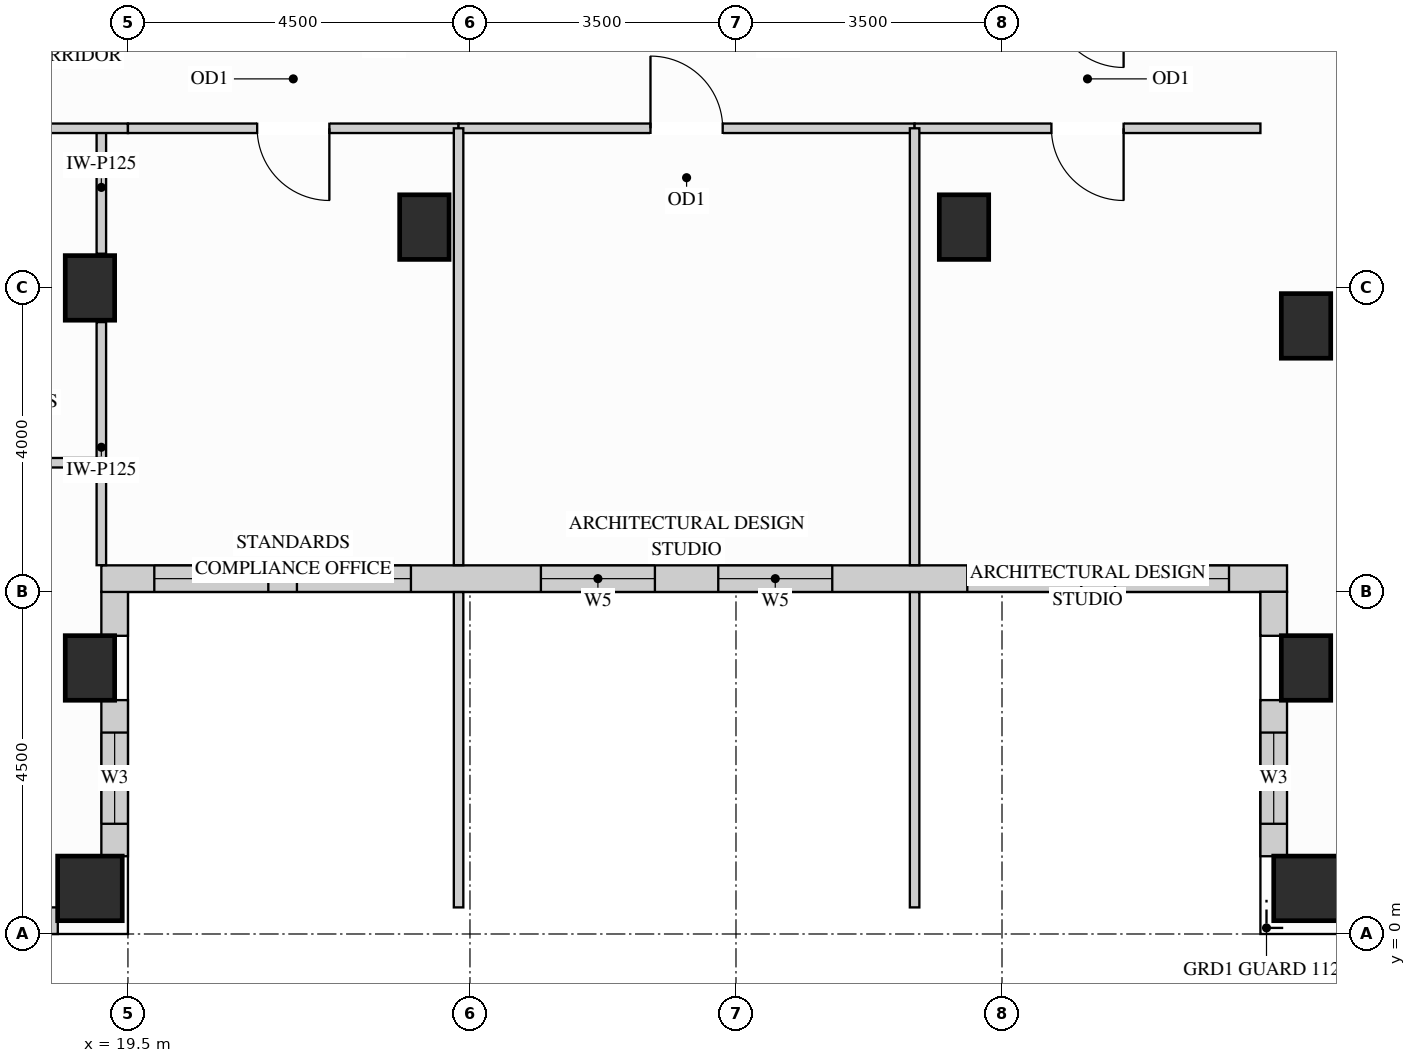
"""IFC4 building model, lengths in metres.
Left out: names, types, materials, properties, quantities, classifications, styles, units other than length and angle.
Written with IfcOpenShell. Run it as: python <this file> out.ifc"""

import sys

from ifc_helpers import new_model, si_unit, direction, frame, frame_2d, origin, origin_2d, place, context, subcontext, project, spatial, rectangle, extrude, source, transform, mapped, element, fill, save


model = new_model("IFC4")
c1 = context("Model", 3, precision=1e-05, world=origin(), true_north=direction((0.0, 1.0)))
c2 = subcontext(c1, "Body", "Model", "MODEL_VIEW")
j1 = project(units=[si_unit("LENGTHUNIT", "METRE"), si_unit("PLANEANGLEUNIT", "RADIAN")], contexts=[c1])
p1 = place(None, origin())
s1 = spatial("IfcSite", under=j1, at=p1, CompositionType="ELEMENT")
p2 = place(p1, origin())
s2 = spatial("IfcBuilding", under=s1, at=p2, CompositionType="ELEMENT")
p3 = place(p2, frame((0.0, 0.0, 219.6)))
s3 = spatial("IfcBuildingStorey", under=s2, at=p3, CompositionType="ELEMENT", Elevation=219.6)
m1 = source(origin(), c2, "Body", "SweptSolid", [
    extrude(rectangle(XDim=0.65, YDim=0.85, at=origin_2d()), origin(), (0.0, 0.0, 1.0), 3.4),
])
for number, where, z_axis, x_axis in (
    (1, (19.0, 3.5, 0.0), (0.0, 0.0, 1.0), (1.0, 0.0, 0.0)),
    (2, (19.0, 8.5, 0.0), (0.0, 0.0, 1.0), (1.0, 0.0, 0.0)),
    (3, (35.0, 3.5, 0.0), (0.0, 0.0, 1.0), (1.0, 0.0, 0.0)),
    (4, (35.0, 8.0, 0.0), (0.0, 0.0, 1.0), (1.0, 0.0, 0.0)),
    (5, (23.4, 9.3, 0.0), (0.0, 0.0, 1.0), (1.0, 0.0, 0.0)),
    (6, (30.5, 9.3, 0.0), (0.0, 0.0, 1.0), (1.0, 0.0, 0.0)),
):
    element("IfcColumn", number, at=place(p3, frame(where, z_axis=z_axis, x_axis=x_axis)), inside=s3, PredefinedType="COLUMN", context=c2, shape_type="MappedRepresentation", body=[
        mapped(m1, transform((0.0, 0.0, 0.0), x_axis=(1.0, 0.0, 0.0), y_axis=(0.0, 1.0, 0.0), z_axis=(0.0, 0.0, 1.0))),
    ])
m2 = source(origin(), c2, "Body", "SweptSolid", [
    extrude(rectangle(XDim=0.85, YDim=0.85, at=origin_2d()), origin(), (0.0, 0.0, 1.0), 3.4),
])
for number, where, z_axis, x_axis in (
    (7, (19.0, 0.6, 0.0), (0.0, 0.0, 1.0), (1.0, 0.0, 0.0)),
    (8, (35.0, 0.6, 0.0), (0.0, 0.0, 1.0), (1.0, 0.0, 0.0)),
):
    element("IfcColumn", number, at=place(p3, frame(where, z_axis=z_axis, x_axis=x_axis)), inside=s3, PredefinedType="COLUMN", context=c2, shape_type="MappedRepresentation", body=[
        mapped(m2, transform((0.0, 0.0, 0.0), x_axis=(1.0, 0.0, 0.0), y_axis=(0.0, 1.0, 0.0), z_axis=(0.0, 0.0, 1.0))),
    ])
p4 = place(p3, frame((14.923, 0.175, 0.0), z_axis=(0.0, 0.0, 1.0), x_axis=(1.0, 0.0, 0.0)))
e9 = element("IfcWall", 9, at=p4, inside=s3, PredefinedType="SOLIDWALL", context=c2, shape_type="SweptSolid", body=[
    extrude(rectangle(XDim=3.654, YDim=0.35, at=frame_2d((1.827, 0.0))), origin(), (0.0, 0.0, 1.0), 3.385),
])
p5 = place(p4, frame((0.627, 0.0, 0.78)))
e10 = element("IfcOpeningElement", 10, at=p5, cuts=e9, PredefinedType="OPENING", context=c2, shape_type="SweptSolid", body=[
    extrude(rectangle(XDim=2.4, YDim=2.1, at=frame_2d((1.2, 1.05))), frame((0.0, 0.185, 0.0), z_axis=(0.0, -1.0, 0.0), x_axis=(1.0, 0.0, 0.0)), (0.0, 0.0, 1.0), 0.37),
])
p6 = place(p3, frame((19.325, 1.023, 0.0), z_axis=(0.0, 0.0, 1.0), x_axis=(0.0, 1.0, 0.0)))
e11 = element("IfcWall", 11, at=p6, inside=s3, PredefinedType="SOLIDWALL", context=c2, shape_type="SweptSolid", body=[
    extrude(rectangle(XDim=2.054, YDim=0.35, at=frame_2d((1.027, 0.0))), origin(), (0.0, 0.0, 1.0), 2.619),
])
p7 = place(p6, frame((0.427, 0.0, 0.78)))
e12 = element("IfcOpeningElement", 12, at=p7, cuts=e11, PredefinedType="OPENING", context=c2, shape_type="SweptSolid", body=[
    extrude(rectangle(XDim=1.2, YDim=1.659, at=frame_2d((0.6, 0.83))), frame((0.0, 0.185, 0.0), z_axis=(0.0, -1.0, 0.0), x_axis=(1.0, 0.0, 0.0)), (0.0, 0.0, 1.0), 0.37),
])
m3 = source(origin(), c2, "Body", "SweptSolid", [
    extrude(rectangle(XDim=0.579, YDim=0.35, at=frame_2d((0.29, 0.0))), origin(), (0.0, 0.0, 1.0), 2.773),
])
p8 = place(p3, frame((19.325, 3.923, 0.0), z_axis=(0.0, 0.0, 1.0), x_axis=(0.0, 1.0, 0.0)))
e13 = element("IfcWall", 13, at=p8, inside=s3, PredefinedType="SOLIDWALL", context=c2, shape_type="MappedRepresentation", body=[
    mapped(m3, transform((0.0, 0.0, 0.0), x_axis=(1.0, 0.0, 0.0), y_axis=(0.0, 1.0, 0.0), z_axis=(0.0, 0.0, 1.0))),
])
p9 = place(p3, frame((19.15, 4.675, 0.0), z_axis=(0.0, 0.0, 1.0), x_axis=(1.0, 0.0, 0.0)))
e14 = element("IfcWall", 14, at=p9, inside=s3, PredefinedType="SOLIDWALL", context=c2, shape_type="SweptSolid", body=[
    extrude(rectangle(XDim=15.6, YDim=0.35, at=frame_2d((7.8, 0.0))), origin(), (0.0, 0.0, 1.0), 3.385),
])
p10 = place(p9, frame((0.697, 0.0, 0.78)))
e15 = element("IfcOpeningElement", 15, at=p10, cuts=e14, PredefinedType="OPENING", context=c2, shape_type="SweptSolid", body=[
    extrude(rectangle(XDim=1.5, YDim=2.0, at=frame_2d((0.75, 1.0))), frame((0.0, 0.185, 0.0), z_axis=(0.0, -1.0, 0.0), x_axis=(1.0, 0.0, 0.0)), (0.0, 0.0, 1.0), 0.37),
])
p11 = place(p9, frame((2.573, 0.0, 0.78)))
e16 = element("IfcOpeningElement", 16, at=p11, cuts=e14, PredefinedType="OPENING", context=c2, shape_type="SweptSolid", body=[
    extrude(rectangle(XDim=1.5, YDim=2.0, at=frame_2d((0.75, 1.0))), frame((0.0, 0.185, 0.0), z_axis=(0.0, -1.0, 0.0), x_axis=(1.0, 0.0, 0.0)), (0.0, 0.0, 1.0), 0.37),
])
p12 = place(p9, frame((5.783, 0.0, 0.78)))
e17 = element("IfcOpeningElement", 17, at=p12, cuts=e14, PredefinedType="OPENING", context=c2, shape_type="SweptSolid", body=[
    extrude(rectangle(XDim=1.5, YDim=2.0, at=frame_2d((0.75, 1.0))), frame((0.0, 0.185, 0.0), z_axis=(0.0, -1.0, 0.0), x_axis=(1.0, 0.0, 0.0)), (0.0, 0.0, 1.0), 0.37),
])
p13 = place(p9, frame((8.117, 0.0, 0.78)))
e18 = element("IfcOpeningElement", 18, at=p13, cuts=e14, PredefinedType="OPENING", context=c2, shape_type="SweptSolid", body=[
    extrude(rectangle(XDim=1.5, YDim=2.0, at=frame_2d((0.75, 1.0))), frame((0.0, 0.185, 0.0), z_axis=(0.0, -1.0, 0.0), x_axis=(1.0, 0.0, 0.0)), (0.0, 0.0, 1.0), 0.37),
])
p14 = place(p9, frame((11.393, 0.0, 0.78)))
e19 = element("IfcOpeningElement", 19, at=p14, cuts=e14, PredefinedType="OPENING", context=c2, shape_type="SweptSolid", body=[
    extrude(rectangle(XDim=1.5, YDim=2.0, at=frame_2d((0.75, 1.0))), frame((0.0, 0.185, 0.0), z_axis=(0.0, -1.0, 0.0), x_axis=(1.0, 0.0, 0.0)), (0.0, 0.0, 1.0), 0.37),
])
p15 = place(p9, frame((13.337, 0.0, 0.78)))
e20 = element("IfcOpeningElement", 20, at=p15, cuts=e14, PredefinedType="OPENING", context=c2, shape_type="SweptSolid", body=[
    extrude(rectangle(XDim=1.5, YDim=2.0, at=frame_2d((0.75, 1.0))), frame((0.0, 0.185, 0.0), z_axis=(0.0, -1.0, 0.0), x_axis=(1.0, 0.0, 0.0)), (0.0, 0.0, 1.0), 0.37),
])
m4 = source(origin(), c2, "Body", "SweptSolid", [
    extrude(rectangle(XDim=0.579, YDim=0.35, at=frame_2d((0.29, 0.0))), origin(), (0.0, 0.0, 1.0), 3.385),
])
p16 = place(p3, frame((34.575, 4.502, 0.0), z_axis=(0.0, 0.0, 1.0), x_axis=(0.0, -1.0, 0.0)))
e21 = element("IfcWall", 21, at=p16, inside=s3, PredefinedType="SOLIDWALL", context=c2, shape_type="MappedRepresentation", body=[
    mapped(m4, transform((0.0, 0.0, 0.0), x_axis=(1.0, 0.0, 0.0), y_axis=(0.0, 1.0, 0.0), z_axis=(0.0, 0.0, 1.0))),
])
p17 = place(p3, frame((34.575, 3.077, 0.0), z_axis=(0.0, 0.0, 1.0), x_axis=(0.0, -1.0, 0.0)))
e22 = element("IfcWall", 22, at=p17, inside=s3, PredefinedType="SOLIDWALL", context=c2, shape_type="SweptSolid", body=[
    extrude(rectangle(XDim=2.054, YDim=0.35, at=frame_2d((1.027, 0.0))), origin(), (0.0, 0.0, 1.0), 3.385),
])
p18 = place(p17, frame((0.427, 0.0, 0.78)))
e23 = element("IfcOpeningElement", 23, at=p18, cuts=e22, PredefinedType="OPENING", context=c2, shape_type="SweptSolid", body=[
    extrude(rectangle(XDim=1.2, YDim=2.0, at=frame_2d((0.6, 1.0))), frame((0.0, 0.185, 0.0), z_axis=(0.0, -1.0, 0.0), x_axis=(1.0, 0.0, 0.0)), (0.0, 0.0, 1.0), 0.37),
])
m5 = source(origin(), c2, "Body", "SweptSolid", [
    extrude(rectangle(XDim=3.198, YDim=0.125, at=frame_2d((1.599, 0.0))), origin(), (0.0, 0.0, 1.0), 2.773),
])
p19 = place(p3, frame((19.15, 4.852, 0.0), z_axis=(0.0, 0.0, 1.0), x_axis=(0.0, 1.0, 0.0)))
e24 = element("IfcWall", 24, at=p19, inside=s3, PredefinedType="PARTITIONING", context=c2, shape_type="MappedRepresentation", body=[
    mapped(m5, transform((0.0, 0.0, 0.0), x_axis=(1.0, 0.0, 0.0), y_axis=(0.0, 1.0, 0.0), z_axis=(0.0, 0.0, 1.0))),
])
m6 = source(origin(), c2, "Body", "SweptSolid", [
    extrude(rectangle(XDim=1.65, YDim=0.125, at=frame_2d((0.825, 0.0))), origin(), (0.0, 0.0, 1.0), 2.773),
])
p20 = place(p3, frame((19.15, 8.95, 0.0), z_axis=(0.0, 0.0, 1.0), x_axis=(0.0, 1.0, 0.0)))
e25 = element("IfcWall", 25, at=p20, inside=s3, PredefinedType="PARTITIONING", context=c2, shape_type="MappedRepresentation", body=[
    mapped(m6, transform((0.0, 0.0, 0.0), x_axis=(1.0, 0.0, 0.0), y_axis=(0.0, 1.0, 0.0), z_axis=(0.0, 0.0, 1.0))),
])
m7 = source(origin(), c2, "Body", "SweptSolid", [
    extrude(rectangle(XDim=2.95, YDim=0.125, at=frame_2d((1.475, 0.0))), origin(), (0.0, 0.0, 1.0), 3.385),
])
p21 = place(p3, frame((16.55, 10.6, 0.0), z_axis=(0.0, 0.0, 1.0), x_axis=(1.0, 0.0, 0.0)))
e26 = element("IfcWall", 26, at=p21, inside=s3, PredefinedType="PARTITIONING", context=c2, shape_type="MappedRepresentation", body=[
    mapped(m7, transform((0.0, 0.0, 0.0), x_axis=(1.0, 0.0, 0.0), y_axis=(0.0, 1.0, 0.0), z_axis=(0.0, 0.0, 1.0))),
])
p22 = place(p3, frame((19.5, 10.6, 0.0), z_axis=(0.0, 0.0, 1.0), x_axis=(1.0, 0.0, 0.0)))
e27 = element("IfcWall", 27, at=p22, inside=s3, PredefinedType="PARTITIONING", context=c2, shape_type="SweptSolid", body=[
    extrude(rectangle(XDim=4.35, YDim=0.125, at=frame_2d((2.175, 0.0))), origin(), (0.0, 0.0, 1.0), 3.385),
])
p23 = place(p22, frame((1.7, 0.0, 0.0)))
e28 = element("IfcOpeningElement", 28, at=p23, cuts=e27, PredefinedType="OPENING", context=c2, shape_type="SweptSolid", body=[
    extrude(rectangle(XDim=0.95, YDim=2.15, at=frame_2d((0.475, 1.075))), frame((0.0, 0.073, 0.0), z_axis=(0.0, -1.0, 0.0), x_axis=(1.0, 0.0, 0.0)), (0.0, 0.0, 1.0), 0.145),
])
p24 = place(p3, frame((23.85, 10.6, 0.0), z_axis=(0.0, 0.0, 1.0), x_axis=(1.0, 0.0, 0.0)))
e29 = element("IfcWall", 29, at=p24, inside=s3, PredefinedType="PARTITIONING", context=c2, shape_type="SweptSolid", body=[
    extrude(rectangle(XDim=6.0, YDim=0.125, at=frame_2d((3.0, 0.0))), origin(), (0.0, 0.0, 1.0), 3.385),
])
p25 = place(p24, frame((2.525, 0.0, 0.0)))
e30 = element("IfcOpeningElement", 30, at=p25, cuts=e29, PredefinedType="OPENING", context=c2, shape_type="SweptSolid", body=[
    extrude(rectangle(XDim=0.95, YDim=2.15, at=frame_2d((0.475, 1.075))), frame((0.0, 0.073, 0.0), z_axis=(0.0, -1.0, 0.0), x_axis=(1.0, 0.0, 0.0)), (0.0, 0.0, 1.0), 0.145),
])
p26 = place(p3, frame((29.85, 10.6, 0.0), z_axis=(0.0, 0.0, 1.0), x_axis=(1.0, 0.0, 0.0)))
e31 = element("IfcWall", 31, at=p26, inside=s3, PredefinedType="PARTITIONING", context=c2, shape_type="SweptSolid", body=[
    extrude(rectangle(XDim=4.55, YDim=0.125, at=frame_2d((2.275, 0.0))), origin(), (0.0, 0.0, 1.0), 3.385),
])
p27 = place(p26, frame((1.8, 0.0, 0.0)))
e32 = element("IfcOpeningElement", 32, at=p27, cuts=e31, PredefinedType="OPENING", context=c2, shape_type="SweptSolid", body=[
    extrude(rectangle(XDim=0.95, YDim=2.15, at=frame_2d((0.475, 1.075))), frame((0.0, 0.073, 0.0), z_axis=(0.0, -1.0, 0.0), x_axis=(1.0, 0.0, 0.0)), (0.0, 0.0, 1.0), 0.145),
])
m8 = source(origin(), c2, "Body", "SweptSolid", [
    extrude(rectangle(XDim=4.148, YDim=0.125, at=frame_2d((2.074, 0.0))), origin(), (0.0, 0.0, 1.0), 3.385),
])
p28 = place(p3, frame((23.85, 0.35, 0.0), z_axis=(0.0, 0.0, 1.0), x_axis=(0.0, 1.0, 0.0)))
e33 = element("IfcWall", 33, at=p28, inside=s3, PredefinedType="PARTITIONING", context=c2, shape_type="MappedRepresentation", body=[
    mapped(m8, transform((0.0, 0.0, 0.0), x_axis=(1.0, 0.0, 0.0), y_axis=(0.0, 1.0, 0.0), z_axis=(0.0, 0.0, 1.0))),
])
m9 = source(origin(), c2, "Body", "SweptSolid", [
    extrude(rectangle(XDim=5.748, YDim=0.125, at=frame_2d((2.874, 0.0))), origin(), (0.0, 0.0, 1.0), 3.385),
])
p29 = place(p3, frame((23.85, 4.852, 0.0), z_axis=(0.0, 0.0, 1.0), x_axis=(0.0, 1.0, 0.0)))
e34 = element("IfcWall", 34, at=p29, inside=s3, PredefinedType="PARTITIONING", context=c2, shape_type="MappedRepresentation", body=[
    mapped(m9, transform((0.0, 0.0, 0.0), x_axis=(1.0, 0.0, 0.0), y_axis=(0.0, 1.0, 0.0), z_axis=(0.0, 0.0, 1.0))),
])
p30 = place(p3, frame((29.85, 0.35, 0.0), z_axis=(0.0, 0.0, 1.0), x_axis=(0.0, 1.0, 0.0)))
e35 = element("IfcWall", 35, at=p30, inside=s3, PredefinedType="PARTITIONING", context=c2, shape_type="MappedRepresentation", body=[
    mapped(m8, transform((0.0, 0.0, 0.0), x_axis=(1.0, 0.0, 0.0), y_axis=(0.0, 1.0, 0.0), z_axis=(0.0, 0.0, 1.0))),
])
p31 = place(p3, frame((29.85, 4.852, 0.0), z_axis=(0.0, 0.0, 1.0), x_axis=(0.0, 1.0, 0.0)))
e36 = element("IfcWall", 36, at=p31, inside=s3, PredefinedType="PARTITIONING", context=c2, shape_type="MappedRepresentation", body=[
    mapped(m9, transform((0.0, 0.0, 0.0), x_axis=(1.0, 0.0, 0.0), y_axis=(0.0, 1.0, 0.0), z_axis=(0.0, 0.0, 1.0))),
])
m10 = source(origin(), c2, "Body", "SweptSolid", [
    extrude(rectangle(XDim=2.6, YDim=0.125, at=frame_2d((1.3, 0.0))), origin(), (0.0, 0.0, 1.0), 2.848),
])
p32 = place(p3, frame((16.55, 6.2, 0.0), z_axis=(0.0, 0.0, 1.0), x_axis=(1.0, 0.0, 0.0)))
e37 = element("IfcWall", 37, at=p32, inside=s3, PredefinedType="PARTITIONING", context=c2, shape_type="MappedRepresentation", body=[
    mapped(m10, transform((0.0, 0.0, 0.0), x_axis=(1.0, 0.0, 0.0), y_axis=(0.0, 1.0, 0.0), z_axis=(0.0, 0.0, 1.0))),
])
m11 = source(origin(), c2, "Body", "SweptSolid", [
    extrude(rectangle(XDim=0.95, YDim=2.15, at=frame_2d((0.475, 1.075))), frame((0.0, 0.025, 0.0), z_axis=(0.0, -1.0, 0.0), x_axis=(1.0, 0.0, 0.0)), (0.0, 0.0, 1.0), 0.05),
])
p33 = place(p23, origin())
e38 = element("IfcDoor", 38, at=p33, inside=s3, OperationType="SINGLE_SWING_RIGHT", PredefinedType="DOOR", context=c2, shape_type="MappedRepresentation", body=[
    mapped(m11, transform((0.0, 0.0, 0.0), x_axis=(1.0, 0.0, 0.0), y_axis=(0.0, 1.0, 0.0), z_axis=(0.0, 0.0, 1.0))),
])
fill(e28, e38)
p34 = place(p25, origin())
e39 = element("IfcDoor", 39, at=p34, inside=s3, OperationType="SINGLE_SWING_LEFT", PredefinedType="DOOR", context=c2, shape_type="MappedRepresentation", body=[
    mapped(m11, transform((0.0, 0.0, 0.0), x_axis=(1.0, 0.0, 0.0), y_axis=(0.0, 1.0, 0.0), z_axis=(0.0, 0.0, 1.0))),
])
fill(e30, e39)
p35 = place(p27, origin())
e40 = element("IfcDoor", 40, at=p35, inside=s3, OperationType="SINGLE_SWING_RIGHT", PredefinedType="DOOR", context=c2, shape_type="MappedRepresentation", body=[
    mapped(m11, transform((0.0, 0.0, 0.0), x_axis=(1.0, 0.0, 0.0), y_axis=(0.0, 1.0, 0.0), z_axis=(0.0, 0.0, 1.0))),
])
fill(e32, e40)
m12 = source(origin(), c2, "Body", "SweptSolid", [
    extrude(rectangle(XDim=1.2, YDim=1.659, at=frame_2d((0.6, 0.83))), frame((0.0, 0.03, 0.0), z_axis=(0.0, -1.0, 0.0), x_axis=(1.0, 0.0, 0.0)), (0.0, 0.0, 1.0), 0.06),
])
p36 = place(p7, origin())
e41 = element("IfcWindow", 41, at=p36, inside=s3, PartitioningType="SINGLE_PANEL", PredefinedType="WINDOW", context=c2, shape_type="MappedRepresentation", body=[
    mapped(m12, transform((0.0, 0.0, 0.0), x_axis=(1.0, 0.0, 0.0), y_axis=(0.0, 1.0, 0.0), z_axis=(0.0, 0.0, 1.0))),
])
fill(e12, e41)
m13 = source(origin(), c2, "Body", "SweptSolid", [
    extrude(rectangle(XDim=1.2, YDim=2.0, at=frame_2d((0.6, 1.0))), frame((0.0, 0.03, 0.0), z_axis=(0.0, -1.0, 0.0), x_axis=(1.0, 0.0, 0.0)), (0.0, 0.0, 1.0), 0.06),
])
p37 = place(p18, origin())
e42 = element("IfcWindow", 42, at=p37, inside=s3, PartitioningType="SINGLE_PANEL", PredefinedType="WINDOW", context=c2, shape_type="MappedRepresentation", body=[
    mapped(m13, transform((0.0, 0.0, 0.0), x_axis=(1.0, 0.0, 0.0), y_axis=(0.0, 1.0, 0.0), z_axis=(0.0, 0.0, 1.0))),
])
fill(e23, e42)
m14 = source(origin(), c2, "Body", "SweptSolid", [
    extrude(rectangle(XDim=1.5, YDim=2.0, at=frame_2d((0.75, 1.0))), frame((0.0, 0.03, 0.0), z_axis=(0.0, -1.0, 0.0), x_axis=(1.0, 0.0, 0.0)), (0.0, 0.0, 1.0), 0.06),
])
p38 = place(p10, origin())
e43 = element("IfcWindow", 43, at=p38, inside=s3, PartitioningType="SINGLE_PANEL", PredefinedType="WINDOW", context=c2, shape_type="MappedRepresentation", body=[
    mapped(m14, transform((0.0, 0.0, 0.0), x_axis=(1.0, 0.0, 0.0), y_axis=(0.0, 1.0, 0.0), z_axis=(0.0, 0.0, 1.0))),
])
fill(e15, e43)
p39 = place(p11, origin())
e44 = element("IfcWindow", 44, at=p39, inside=s3, PartitioningType="SINGLE_PANEL", PredefinedType="WINDOW", context=c2, shape_type="MappedRepresentation", body=[
    mapped(m14, transform((0.0, 0.0, 0.0), x_axis=(1.0, 0.0, 0.0), y_axis=(0.0, 1.0, 0.0), z_axis=(0.0, 0.0, 1.0))),
])
fill(e16, e44)
p40 = place(p12, origin())
e45 = element("IfcWindow", 45, at=p40, inside=s3, PartitioningType="SINGLE_PANEL", PredefinedType="WINDOW", context=c2, shape_type="MappedRepresentation", body=[
    mapped(m14, transform((0.0, 0.0, 0.0), x_axis=(1.0, 0.0, 0.0), y_axis=(0.0, 1.0, 0.0), z_axis=(0.0, 0.0, 1.0))),
])
fill(e17, e45)
p41 = place(p13, origin())
e46 = element("IfcWindow", 46, at=p41, inside=s3, PartitioningType="SINGLE_PANEL", PredefinedType="WINDOW", context=c2, shape_type="MappedRepresentation", body=[
    mapped(m14, transform((0.0, 0.0, 0.0), x_axis=(1.0, 0.0, 0.0), y_axis=(0.0, 1.0, 0.0), z_axis=(0.0, 0.0, 1.0))),
])
fill(e18, e46)
p42 = place(p14, origin())
e47 = element("IfcWindow", 47, at=p42, inside=s3, PartitioningType="SINGLE_PANEL", PredefinedType="WINDOW", context=c2, shape_type="MappedRepresentation", body=[
    mapped(m14, transform((0.0, 0.0, 0.0), x_axis=(1.0, 0.0, 0.0), y_axis=(0.0, 1.0, 0.0), z_axis=(0.0, 0.0, 1.0))),
])
fill(e19, e47)
p43 = place(p15, origin())
e48 = element("IfcWindow", 48, at=p43, inside=s3, PartitioningType="SINGLE_PANEL", PredefinedType="WINDOW", context=c2, shape_type="MappedRepresentation", body=[
    mapped(m14, transform((0.0, 0.0, 0.0), x_axis=(1.0, 0.0, 0.0), y_axis=(0.0, 1.0, 0.0), z_axis=(0.0, 0.0, 1.0))),
])
fill(e20, e48)
save(model, sys.argv[1])
